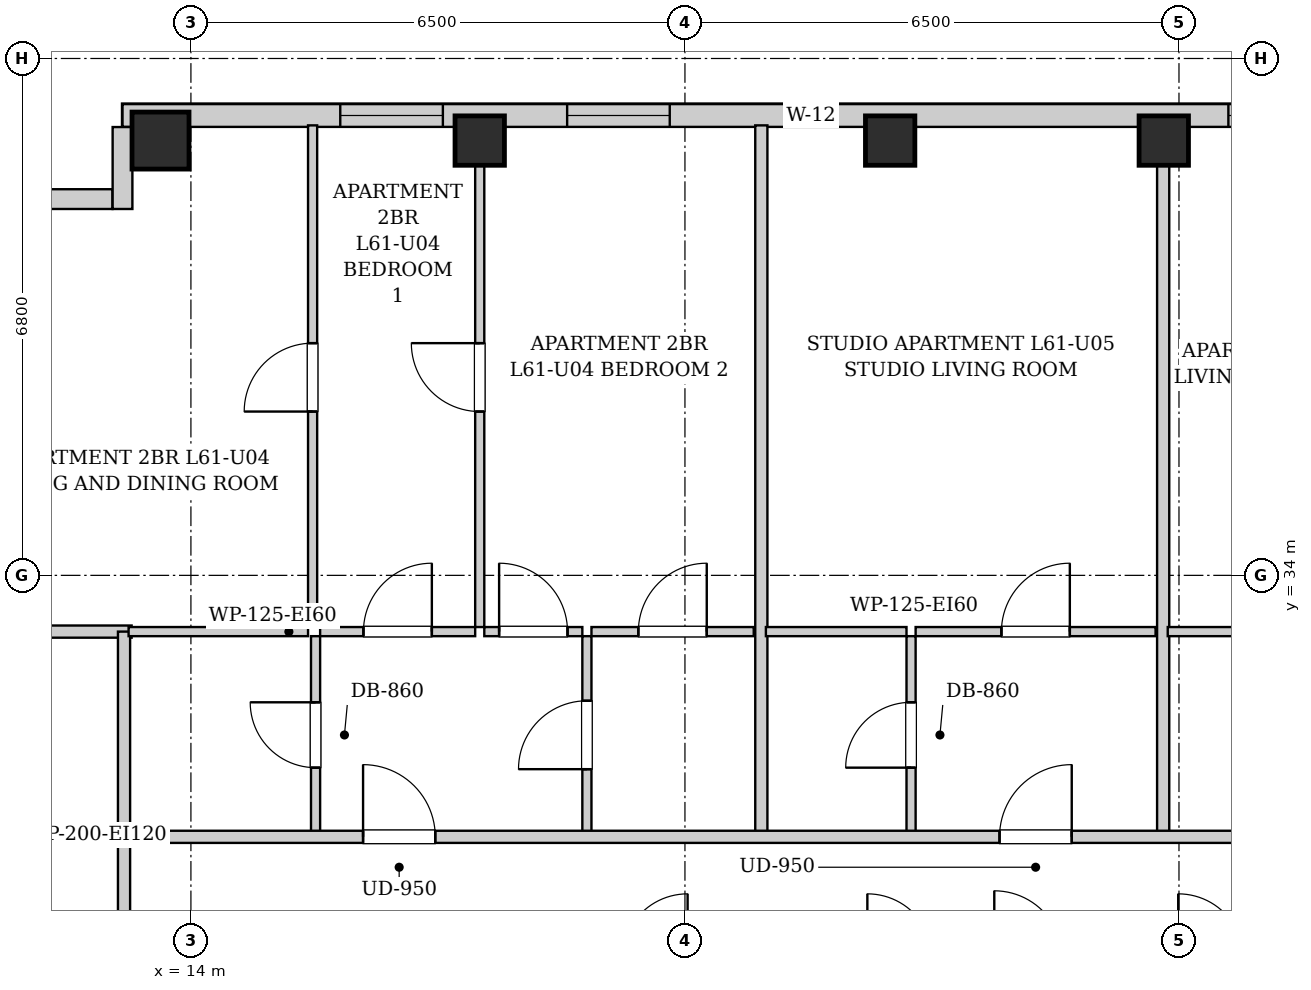
"""IFC4 building model, lengths in metres.
Left out: names, types, materials, properties, quantities, classifications, styles, units other than length and angle.
Written with IfcOpenShell. Run it as: python <this file> out.ifc"""

import sys

from ifc_helpers import new_model, si_unit, direction, frame, frame_2d, origin, origin_2d, place, context, subcontext, project, spatial, rectangle, extrude, element, fill, save


model = new_model("IFC4")
c1 = context("Model", 3, precision=1e-05, world=origin(), true_north=direction((0.0, 1.0)))
c2 = subcontext(c1, "Body", "Model", "MODEL_VIEW")
j1 = project(units=[si_unit("LENGTHUNIT", "METRE"), si_unit("PLANEANGLEUNIT", "RADIAN")], contexts=[c1])
p1 = place(None, origin())
s1 = spatial("IfcSite", under=j1, at=p1, CompositionType="ELEMENT")
p2 = place(p1, origin())
s2 = spatial("IfcBuilding", under=s1, at=p2, CompositionType="ELEMENT")
p3 = place(p2, frame((0.0, 0.0, 210.7)))
s3 = spatial("IfcBuildingStorey", under=s2, at=p3, CompositionType="ELEMENT", Elevation=210.7)
p4 = place(p3, frame((13.6, 39.72, 0.0), z_axis=(0.0, 0.0, 1.0), x_axis=(1.0, 0.0, 0.0)))
e1 = element("IfcColumn", 1, at=p4, inside=s3, PredefinedType="COLUMN", context=c2, shape_type="SweptSolid", body=[
    extrude(rectangle(XDim=0.75, YDim=0.75, at=origin_2d()), origin(), (0.0, 0.0, 1.0), 3.3),
])
for number, where, z_axis, x_axis in (
    (2, (17.8, 39.72, 0.0), (0.0, 0.0, 1.0), (1.0, 0.0, 0.0)),
    (3, (23.2, 39.72, 0.0), (0.0, 0.0, 1.0), (1.0, 0.0, 0.0)),
    (4, (26.8, 39.72, 0.0), (0.0, 0.0, 1.0), (1.0, 0.0, 0.0)),
):
    element("IfcColumn", number, at=place(p3, frame(where, z_axis=z_axis, x_axis=x_axis)), inside=s3, PredefinedType="COLUMN", context=c2, shape_type="SweptSolid", body=[
        extrude(rectangle(XDim=0.65, YDim=0.65, at=origin_2d()), origin(), (0.0, 0.0, 1.0), 3.3),
    ])
p5 = place(p3, frame((13.1, 40.05, 0.0), z_axis=(0.0, 0.0, 1.0), x_axis=(1.0, 0.0, 0.0)))
e5 = element("IfcWall", 5, at=p5, inside=s3, PredefinedType="SOLIDWALL", context=c2, shape_type="SweptSolid", body=[
    extrude(rectangle(XDim=16.95, YDim=0.3, at=frame_2d((8.475, 0.0))), origin(), (0.0, 0.0, 1.0), 3.04),
])
p6 = place(p5, frame((2.865, 0.0, 0.55)))
e6 = element("IfcOpeningElement", 6, at=p6, cuts=e5, PredefinedType="OPENING", context=c2, shape_type="SweptSolid", body=[
    extrude(rectangle(XDim=1.35, YDim=1.2, at=frame_2d((0.675, 0.6))), frame((0.0, 0.16, 0.0), z_axis=(0.0, -1.0, 0.0), x_axis=(1.0, 0.0, 0.0)), (0.0, 0.0, 1.0), 0.32),
])
p7 = place(p5, frame((5.85, 0.0, 0.55)))
e7 = element("IfcOpeningElement", 7, at=p7, cuts=e5, PredefinedType="OPENING", context=c2, shape_type="SweptSolid", body=[
    extrude(rectangle(XDim=1.35, YDim=1.2, at=frame_2d((0.675, 0.6))), frame((0.0, 0.16, 0.0), z_axis=(0.0, -1.0, 0.0), x_axis=(1.0, 0.0, 0.0)), (0.0, 0.0, 1.0), 0.32),
])
p8 = place(p5, frame((8.72, 0.0, 0.55)))
e8 = element("IfcOpeningElement", 8, at=p8, cuts=e5, PredefinedType="OPENING", context=c2, shape_type="SweptSolid", body=[
    extrude(rectangle(XDim=0.68, YDim=1.2, at=frame_2d((0.34, 0.6))), frame((0.0, 0.16, 0.0), z_axis=(0.0, -1.0, 0.0), x_axis=(1.0, 0.0, 0.0)), (0.0, 0.0, 1.0), 0.32),
])
p9 = place(p5, frame((14.55, 0.0, 0.55)))
e9 = element("IfcOpeningElement", 9, at=p9, cuts=e5, PredefinedType="OPENING", context=c2, shape_type="SweptSolid", body=[
    extrude(rectangle(XDim=1.35, YDim=1.2, at=frame_2d((0.675, 0.6))), frame((0.0, 0.16, 0.0), z_axis=(0.0, -1.0, 0.0), x_axis=(1.0, 0.0, 0.0)), (0.0, 0.0, 1.0), 0.32),
])
p10 = place(p3, frame((11.982, 38.95, 0.0), z_axis=(0.0, 0.0, 1.0), x_axis=(1.0, 0.0, 0.0)))
e10 = element("IfcWall", 10, at=p10, inside=s3, PredefinedType="SOLIDWALL", context=c2, shape_type="SweptSolid", body=[
    extrude(rectangle(XDim=0.986, YDim=0.26, at=frame_2d((0.493, 0.0))), origin(), (0.0, 0.0, 1.0), 3.04),
])
p11 = place(p3, frame((13.1, 38.82, 0.0), z_axis=(0.0, 0.0, 1.0), x_axis=(0.0, 1.0, 0.0)))
e11 = element("IfcWall", 11, at=p11, inside=s3, PredefinedType="SOLIDWALL", context=c2, shape_type="SweptSolid", body=[
    extrude(rectangle(XDim=1.078, YDim=0.26, at=frame_2d((0.539, 0.0))), origin(), (0.0, 0.0, 1.0), 3.04),
])
p12 = place(p3, frame((13.12, 28.98, 0.0), z_axis=(0.0, 0.0, 1.0), x_axis=(0.0, 1.0, 0.0)))
e12 = element("IfcWall", 12, at=p12, inside=s3, PredefinedType="PARTITIONING", context=c2, shape_type="SweptSolid", body=[
    extrude(rectangle(XDim=1.58, YDim=0.16, at=frame_2d((0.79, 0.0))), origin(), (0.0, 0.0, 1.0), 3.04),
])
p13 = place(p3, frame((10.88, 33.26, 0.0), z_axis=(0.0, 0.0, 1.0), x_axis=(1.0, 0.0, 0.0)))
e13 = element("IfcWall", 13, at=p13, inside=s3, PredefinedType="PARTITIONING", context=c2, shape_type="SweptSolid", body=[
    extrude(rectangle(XDim=2.34, YDim=0.16, at=frame_2d((1.17, 0.0))), origin(), (0.0, 0.0, 1.0), 3.04),
])
p14 = place(p3, frame((13.12, 30.6, 0.0), z_axis=(0.0, 0.0, 1.0), x_axis=(0.0, 1.0, 0.0)))
e14 = element("IfcWall", 14, at=p14, inside=s3, PredefinedType="PARTITIONING", context=c2, shape_type="SweptSolid", body=[
    extrude(rectangle(XDim=2.66, YDim=0.16, at=frame_2d((1.33, 0.0))), origin(), (0.0, 0.0, 1.0), 3.04),
])
p15 = place(p3, frame((15.64, 30.6, 0.0), z_axis=(0.0, 0.0, 1.0), x_axis=(0.0, 1.0, 0.0)))
e15 = element("IfcWall", 15, at=p15, inside=s3, PredefinedType="PARTITIONING", context=c2, shape_type="SweptSolid", body=[
    extrude(rectangle(XDim=2.6, YDim=0.12, at=frame_2d((1.3, 0.0))), origin(), (0.0, 0.0, 1.0), 3.04),
])
p16 = place(p15, frame((0.87, 0.0, 0.0)))
e16 = element("IfcOpeningElement", 16, at=p16, cuts=e15, PredefinedType="OPENING", context=c2, shape_type="SweptSolid", body=[
    extrude(rectangle(XDim=0.86, YDim=2.05, at=frame_2d((0.43, 1.025))), frame((0.0, 0.07, 0.0), z_axis=(0.0, -1.0, 0.0), x_axis=(1.0, 0.0, 0.0)), (0.0, 0.0, 1.0), 0.14),
])
p17 = place(p3, frame((13.18, 33.26, 0.0), z_axis=(0.0, 0.0, 1.0), x_axis=(1.0, 0.0, 0.0)))
e17 = element("IfcWall", 17, at=p17, inside=s3, PredefinedType="PARTITIONING", context=c2, shape_type="SweptSolid", body=[
    extrude(rectangle(XDim=2.361, YDim=0.12, at=frame_2d((1.181, 0.0))), origin(), (0.0, 0.0, 1.0), 3.04),
])
p18 = place(p3, frame((19.21, 30.6, 0.0), z_axis=(0.0, 0.0, 1.0), x_axis=(0.0, 1.0, 0.0)))
e18 = element("IfcWall", 18, at=p18, inside=s3, PredefinedType="PARTITIONING", context=c2, shape_type="SweptSolid", body=[
    extrude(rectangle(XDim=2.6, YDim=0.12, at=frame_2d((1.3, 0.0))), origin(), (0.0, 0.0, 1.0), 3.04),
])
p19 = place(p18, frame((0.85, 0.0, 0.0)))
e19 = element("IfcOpeningElement", 19, at=p19, cuts=e18, PredefinedType="OPENING", context=c2, shape_type="SweptSolid", body=[
    extrude(rectangle(XDim=0.9, YDim=2.05, at=frame_2d((0.45, 1.025))), frame((0.0, 0.07, 0.0), z_axis=(0.0, -1.0, 0.0), x_axis=(1.0, 0.0, 0.0)), (0.0, 0.0, 1.0), 0.14),
])
p20 = place(p3, frame((15.7, 33.26, 0.0), z_axis=(0.0, 0.0, 1.0), x_axis=(1.0, 0.0, 0.0)))
e20 = element("IfcWall", 20, at=p20, inside=s3, PredefinedType="PARTITIONING", context=c2, shape_type="SweptSolid", body=[
    extrude(rectangle(XDim=2.04, YDim=0.12, at=frame_2d((1.02, 0.0))), origin(), (0.0, 0.0, 1.0), 3.04),
])
p21 = place(p20, frame((0.57, 0.0, 0.0)))
e21 = element("IfcOpeningElement", 21, at=p21, cuts=e20, PredefinedType="OPENING", context=c2, shape_type="SweptSolid", body=[
    extrude(rectangle(XDim=0.9, YDim=2.05, at=frame_2d((0.45, 1.025))), frame((0.0, 0.07, 0.0), z_axis=(0.0, -1.0, 0.0), x_axis=(1.0, 0.0, 0.0)), (0.0, 0.0, 1.0), 0.14),
])
p22 = place(p3, frame((17.86, 33.26, 0.0), z_axis=(0.0, 0.0, 1.0), x_axis=(1.0, 0.0, 0.0)))
e22 = element("IfcWall", 22, at=p22, inside=s3, PredefinedType="PARTITIONING", context=c2, shape_type="SweptSolid", body=[
    extrude(rectangle(XDim=1.29, YDim=0.12, at=frame_2d((0.645, 0.0))), origin(), (0.0, 0.0, 1.0), 3.04),
])
p23 = place(p22, frame((0.195, 0.0, 0.0)))
e23 = element("IfcOpeningElement", 23, at=p23, cuts=e22, PredefinedType="OPENING", context=c2, shape_type="SweptSolid", body=[
    extrude(rectangle(XDim=0.9, YDim=2.05, at=frame_2d((0.45, 1.025))), frame((0.0, 0.07, 0.0), z_axis=(0.0, -1.0, 0.0), x_axis=(1.0, 0.0, 0.0)), (0.0, 0.0, 1.0), 0.14),
])
p24 = place(p3, frame((19.27, 33.26, 0.0), z_axis=(0.0, 0.0, 1.0), x_axis=(1.0, 0.0, 0.0)))
e24 = element("IfcWall", 24, at=p24, inside=s3, PredefinedType="PARTITIONING", context=c2, shape_type="SweptSolid", body=[
    extrude(rectangle(XDim=2.135, YDim=0.12, at=frame_2d((1.067, 0.0))), origin(), (0.0, 0.0, 1.0), 3.04),
])
p25 = place(p24, frame((0.617, 0.0, 0.0)))
e25 = element("IfcOpeningElement", 25, at=p25, cuts=e24, PredefinedType="OPENING", context=c2, shape_type="SweptSolid", body=[
    extrude(rectangle(XDim=0.9, YDim=2.05, at=frame_2d((0.45, 1.025))), frame((0.0, 0.07, 0.0), z_axis=(0.0, -1.0, 0.0), x_axis=(1.0, 0.0, 0.0)), (0.0, 0.0, 1.0), 0.14),
])
p26 = place(p3, frame((15.601, 33.32, 0.0), z_axis=(0.0, 0.0, 1.0), x_axis=(0.0, 1.0, 0.0)))
e26 = element("IfcWall", 26, at=p26, inside=s3, PredefinedType="PARTITIONING", context=c2, shape_type="SweptSolid", body=[
    extrude(rectangle(XDim=6.6, YDim=0.12, at=frame_2d((3.3, 0.0))), origin(), (0.0, 0.0, 1.0), 3.04),
])
p27 = place(p26, frame((2.835, 0.0, 0.0)))
e27 = element("IfcOpeningElement", 27, at=p27, cuts=e26, PredefinedType="OPENING", context=c2, shape_type="SweptSolid", body=[
    extrude(rectangle(XDim=0.9, YDim=2.05, at=frame_2d((0.45, 1.025))), frame((0.0, 0.07, 0.0), z_axis=(0.0, -1.0, 0.0), x_axis=(1.0, 0.0, 0.0)), (0.0, 0.0, 1.0), 0.14),
])
p28 = place(p3, frame((17.8, 33.32, 0.0), z_axis=(0.0, 0.0, 1.0), x_axis=(0.0, 1.0, 0.0)))
e28 = element("IfcWall", 28, at=p28, inside=s3, PredefinedType="PARTITIONING", context=c2, shape_type="SweptSolid", body=[
    extrude(rectangle(XDim=6.6, YDim=0.12, at=frame_2d((3.3, 0.0))), origin(), (0.0, 0.0, 1.0), 2.556),
])
p29 = place(p28, frame((2.835, 0.0, 0.0)))
e29 = element("IfcOpeningElement", 29, at=p29, cuts=e28, PredefinedType="OPENING", context=c2, shape_type="SweptSolid", body=[
    extrude(rectangle(XDim=0.9, YDim=2.05, at=frame_2d((0.45, 1.025))), frame((0.0, 0.07, 0.0), z_axis=(0.0, -1.0, 0.0), x_axis=(1.0, 0.0, 0.0)), (0.0, 0.0, 1.0), 0.14),
])
p30 = place(p3, frame((21.505, 30.6, 0.0), z_axis=(0.0, 0.0, 1.0), x_axis=(0.0, 1.0, 0.0)))
e30 = element("IfcWall", 30, at=p30, inside=s3, PredefinedType="PARTITIONING", context=c2, shape_type="SweptSolid", body=[
    extrude(rectangle(XDim=9.32, YDim=0.16, at=frame_2d((4.66, 0.0))), origin(), (0.0, 0.0, 1.0), 3.04),
])
p31 = place(p3, frame((23.475, 30.6, 0.0), z_axis=(0.0, 0.0, 1.0), x_axis=(0.0, 1.0, 0.0)))
e31 = element("IfcWall", 31, at=p31, inside=s3, PredefinedType="PARTITIONING", context=c2, shape_type="SweptSolid", body=[
    extrude(rectangle(XDim=2.6, YDim=0.12, at=frame_2d((1.3, 0.0))), origin(), (0.0, 0.0, 1.0), 3.04),
])
p32 = place(p31, frame((0.87, 0.0, 0.0)))
e32 = element("IfcOpeningElement", 32, at=p32, cuts=e31, PredefinedType="OPENING", context=c2, shape_type="SweptSolid", body=[
    extrude(rectangle(XDim=0.86, YDim=2.05, at=frame_2d((0.43, 1.025))), frame((0.0, 0.07, 0.0), z_axis=(0.0, -1.0, 0.0), x_axis=(1.0, 0.0, 0.0)), (0.0, 0.0, 1.0), 0.14),
])
p33 = place(p3, frame((21.565, 33.26, 0.0), z_axis=(0.0, 0.0, 1.0), x_axis=(1.0, 0.0, 0.0)))
e33 = element("IfcWall", 33, at=p33, inside=s3, PredefinedType="PARTITIONING", context=c2, shape_type="SweptSolid", body=[
    extrude(rectangle(XDim=1.85, YDim=0.12, at=frame_2d((0.925, 0.0))), origin(), (0.0, 0.0, 1.0), 3.04),
])
p34 = place(p3, frame((23.535, 33.26, 0.0), z_axis=(0.0, 0.0, 1.0), x_axis=(1.0, 0.0, 0.0)))
e34 = element("IfcWall", 34, at=p34, inside=s3, PredefinedType="PARTITIONING", context=c2, shape_type="SweptSolid", body=[
    extrude(rectangle(XDim=3.157, YDim=0.12, at=frame_2d((1.579, 0.0))), origin(), (0.0, 0.0, 1.0), 3.04),
])
p35 = place(p34, frame((1.129, 0.0, 0.0)))
e35 = element("IfcOpeningElement", 35, at=p35, cuts=e34, PredefinedType="OPENING", context=c2, shape_type="SweptSolid", body=[
    extrude(rectangle(XDim=0.9, YDim=2.05, at=frame_2d((0.45, 1.025))), frame((0.0, 0.07, 0.0), z_axis=(0.0, -1.0, 0.0), x_axis=(1.0, 0.0, 0.0)), (0.0, 0.0, 1.0), 0.14),
])
p36 = place(p3, frame((26.792, 30.6, 0.0), z_axis=(0.0, 0.0, 1.0), x_axis=(0.0, 1.0, 0.0)))
e36 = element("IfcWall", 36, at=p36, inside=s3, PredefinedType="PARTITIONING", context=c2, shape_type="SweptSolid", body=[
    extrude(rectangle(XDim=9.32, YDim=0.16, at=frame_2d((4.66, 0.0))), origin(), (0.0, 0.0, 1.0), 3.04),
])
p37 = place(p3, frame((26.852, 33.26, 0.0), z_axis=(0.0, 0.0, 1.0), x_axis=(1.0, 0.0, 0.0)))
e37 = element("IfcWall", 37, at=p37, inside=s3, PredefinedType="PARTITIONING", context=c2, shape_type="SweptSolid", body=[
    extrude(rectangle(XDim=2.4, YDim=0.12, at=frame_2d((1.2, 0.0))), origin(), (0.0, 0.0, 1.0), 3.04),
])
p38 = place(p3, frame((13.15, 30.56, 0.0), z_axis=(0.0, 0.0, 1.0), x_axis=(1.0, 0.0, 0.0)))
e38 = element("IfcWall", 38, at=p38, inside=s3, PredefinedType="PARTITIONING", context=c2, shape_type="SweptSolid", body=[
    extrude(rectangle(XDim=24.6, YDim=0.16, at=frame_2d((12.3, 0.0))), origin(), (0.0, 0.0, 1.0), 3.04),
])
p39 = place(p38, frame((3.115, 0.0, 0.0)))
e39 = element("IfcOpeningElement", 39, at=p39, cuts=e38, PredefinedType="OPENING", context=c2, shape_type="SweptSolid", body=[
    extrude(rectangle(XDim=0.95, YDim=2.1, at=frame_2d((0.475, 1.05))), frame((0.0, 0.09, 0.0), z_axis=(0.0, -1.0, 0.0), x_axis=(1.0, 0.0, 0.0)), (0.0, 0.0, 1.0), 0.18),
])
p40 = place(p38, frame((11.489, 0.0, 0.0)))
e40 = element("IfcOpeningElement", 40, at=p40, cuts=e38, PredefinedType="OPENING", context=c2, shape_type="SweptSolid", body=[
    extrude(rectangle(XDim=0.95, YDim=2.1, at=frame_2d((0.475, 1.05))), frame((0.0, 0.09, 0.0), z_axis=(0.0, -1.0, 0.0), x_axis=(1.0, 0.0, 0.0)), (0.0, 0.0, 1.0), 0.18),
])
p41 = place(p38, frame((17.707, 0.0, 0.0)))
e41 = element("IfcOpeningElement", 41, at=p41, cuts=e38, PredefinedType="OPENING", context=c2, shape_type="SweptSolid", body=[
    extrude(rectangle(XDim=0.95, YDim=2.1, at=frame_2d((0.475, 1.05))), frame((0.0, 0.09, 0.0), z_axis=(0.0, -1.0, 0.0), x_axis=(1.0, 0.0, 0.0)), (0.0, 0.0, 1.0), 0.18),
])
p42 = place(p16, origin())
e42 = element("IfcDoor", 42, at=p42, inside=s3, OperationType="SINGLE_SWING_RIGHT", PredefinedType="DOOR", context=c2, shape_type="SweptSolid", body=[
    extrude(rectangle(XDim=0.86, YDim=2.05, at=frame_2d((0.43, 1.025))), frame((0.0, 0.025, 0.0), z_axis=(0.0, -1.0, 0.0), x_axis=(1.0, 0.0, 0.0)), (0.0, 0.0, 1.0), 0.05),
])
fill(e16, e42)
p43 = place(p19, origin())
e43 = element("IfcDoor", 43, at=p43, inside=s3, OperationType="SINGLE_SWING_LEFT", PredefinedType="DOOR", context=c2, shape_type="SweptSolid", body=[
    extrude(rectangle(XDim=0.9, YDim=2.05, at=frame_2d((0.45, 1.025))), frame((0.0, 0.025, 0.0), z_axis=(0.0, -1.0, 0.0), x_axis=(1.0, 0.0, 0.0)), (0.0, 0.0, 1.0), 0.05),
])
fill(e19, e43)
p44 = place(p21, origin())
e44 = element("IfcDoor", 44, at=p44, inside=s3, OperationType="SINGLE_SWING_RIGHT", PredefinedType="DOOR", context=c2, shape_type="SweptSolid", body=[
    extrude(rectangle(XDim=0.9, YDim=2.05, at=frame_2d((0.45, 1.025))), frame((0.0, 0.025, 0.0), z_axis=(0.0, -1.0, 0.0), x_axis=(1.0, 0.0, 0.0)), (0.0, 0.0, 1.0), 0.05),
])
fill(e21, e44)
p45 = place(p23, origin())
e45 = element("IfcDoor", 45, at=p45, inside=s3, OperationType="SINGLE_SWING_LEFT", PredefinedType="DOOR", context=c2, shape_type="SweptSolid", body=[
    extrude(rectangle(XDim=0.9, YDim=2.05, at=frame_2d((0.45, 1.025))), frame((0.0, 0.025, 0.0), z_axis=(0.0, -1.0, 0.0), x_axis=(1.0, 0.0, 0.0)), (0.0, 0.0, 1.0), 0.05),
])
fill(e23, e45)
p46 = place(p25, origin())
e46 = element("IfcDoor", 46, at=p46, inside=s3, OperationType="SINGLE_SWING_RIGHT", PredefinedType="DOOR", context=c2, shape_type="SweptSolid", body=[
    extrude(rectangle(XDim=0.9, YDim=2.05, at=frame_2d((0.45, 1.025))), frame((0.0, 0.025, 0.0), z_axis=(0.0, -1.0, 0.0), x_axis=(1.0, 0.0, 0.0)), (0.0, 0.0, 1.0), 0.05),
])
fill(e25, e46)
p47 = place(p27, origin())
e47 = element("IfcDoor", 47, at=p47, inside=s3, OperationType="SINGLE_SWING_LEFT", PredefinedType="DOOR", context=c2, shape_type="SweptSolid", body=[
    extrude(rectangle(XDim=0.9, YDim=2.05, at=frame_2d((0.45, 1.025))), frame((0.0, 0.025, 0.0), z_axis=(0.0, -1.0, 0.0), x_axis=(1.0, 0.0, 0.0)), (0.0, 0.0, 1.0), 0.05),
])
fill(e27, e47)
p48 = place(p29, origin())
e48 = element("IfcDoor", 48, at=p48, inside=s3, OperationType="SINGLE_SWING_RIGHT", PredefinedType="DOOR", context=c2, shape_type="SweptSolid", body=[
    extrude(rectangle(XDim=0.9, YDim=2.05, at=frame_2d((0.45, 1.025))), frame((0.0, 0.025, 0.0), z_axis=(0.0, -1.0, 0.0), x_axis=(1.0, 0.0, 0.0)), (0.0, 0.0, 1.0), 0.05),
])
fill(e29, e48)
p49 = place(p32, origin())
e49 = element("IfcDoor", 49, at=p49, inside=s3, OperationType="SINGLE_SWING_LEFT", PredefinedType="DOOR", context=c2, shape_type="SweptSolid", body=[
    extrude(rectangle(XDim=0.86, YDim=2.05, at=frame_2d((0.43, 1.025))), frame((0.0, 0.025, 0.0), z_axis=(0.0, -1.0, 0.0), x_axis=(1.0, 0.0, 0.0)), (0.0, 0.0, 1.0), 0.05),
])
fill(e32, e49)
p50 = place(p35, origin())
e50 = element("IfcDoor", 50, at=p50, inside=s3, OperationType="SINGLE_SWING_RIGHT", PredefinedType="DOOR", context=c2, shape_type="SweptSolid", body=[
    extrude(rectangle(XDim=0.9, YDim=2.05, at=frame_2d((0.45, 1.025))), frame((0.0, 0.025, 0.0), z_axis=(0.0, -1.0, 0.0), x_axis=(1.0, 0.0, 0.0)), (0.0, 0.0, 1.0), 0.05),
])
fill(e35, e50)
p51 = place(p39, origin())
e51 = element("IfcDoor", 51, at=p51, inside=s3, OperationType="SINGLE_SWING_LEFT", PredefinedType="DOOR", context=c2, shape_type="SweptSolid", body=[
    extrude(rectangle(XDim=0.95, YDim=2.1, at=frame_2d((0.475, 1.05))), frame((0.0, 0.025, 0.0), z_axis=(0.0, -1.0, 0.0), x_axis=(1.0, 0.0, 0.0)), (0.0, 0.0, 1.0), 0.05),
])
fill(e39, e51)
p52 = place(p40, origin())
e52 = element("IfcDoor", 52, at=p52, inside=s3, OperationType="SINGLE_SWING_RIGHT", PredefinedType="DOOR", context=c2, shape_type="SweptSolid", body=[
    extrude(rectangle(XDim=0.95, YDim=2.1, at=frame_2d((0.475, 1.05))), frame((0.0, 0.025, 0.0), z_axis=(0.0, -1.0, 0.0), x_axis=(1.0, 0.0, 0.0)), (0.0, 0.0, 1.0), 0.05),
])
fill(e40, e52)
p53 = place(p6, origin())
e53 = element("IfcWindow", 53, at=p53, inside=s3, PartitioningType="SINGLE_PANEL", PredefinedType="WINDOW", context=c2, shape_type="SweptSolid", body=[
    extrude(rectangle(XDim=1.35, YDim=1.2, at=frame_2d((0.675, 0.6))), frame((0.0, 0.03, 0.0), z_axis=(0.0, -1.0, 0.0), x_axis=(1.0, 0.0, 0.0)), (0.0, 0.0, 1.0), 0.06),
])
fill(e6, e53)
p54 = place(p7, origin())
e54 = element("IfcWindow", 54, at=p54, inside=s3, PartitioningType="SINGLE_PANEL", PredefinedType="WINDOW", context=c2, shape_type="SweptSolid", body=[
    extrude(rectangle(XDim=1.35, YDim=1.2, at=frame_2d((0.675, 0.6))), frame((0.0, 0.03, 0.0), z_axis=(0.0, -1.0, 0.0), x_axis=(1.0, 0.0, 0.0)), (0.0, 0.0, 1.0), 0.06),
])
fill(e7, e54)
p55 = place(p8, origin())
e55 = element("IfcWindow", 55, at=p55, inside=s3, PartitioningType="SINGLE_PANEL", PredefinedType="WINDOW", context=c2, shape_type="SweptSolid", body=[
    extrude(rectangle(XDim=0.68, YDim=1.2, at=frame_2d((0.34, 0.6))), frame((0.0, 0.03, 0.0), z_axis=(0.0, -1.0, 0.0), x_axis=(1.0, 0.0, 0.0)), (0.0, 0.0, 1.0), 0.06),
])
fill(e8, e55)
p56 = place(p9, origin())
e56 = element("IfcWindow", 56, at=p56, inside=s3, PartitioningType="SINGLE_PANEL", PredefinedType="WINDOW", context=c2, shape_type="SweptSolid", body=[
    extrude(rectangle(XDim=1.35, YDim=1.2, at=frame_2d((0.675, 0.6))), frame((0.0, 0.03, 0.0), z_axis=(0.0, -1.0, 0.0), x_axis=(1.0, 0.0, 0.0)), (0.0, 0.0, 1.0), 0.06),
])
fill(e9, e56)
save(model, sys.argv[1])
